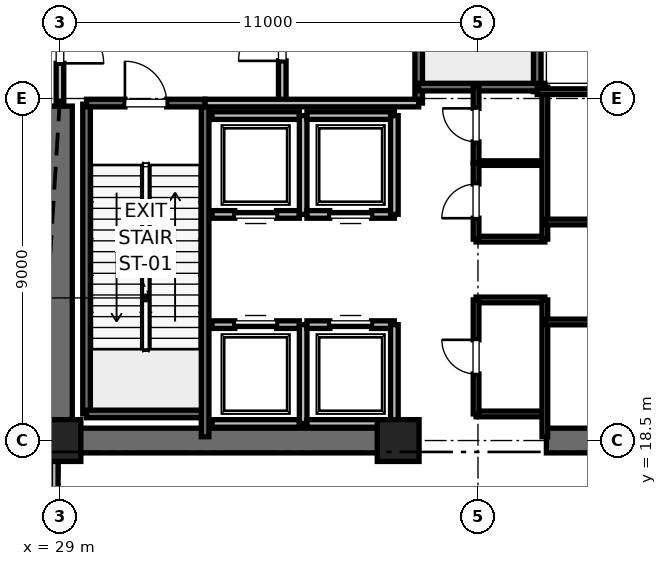
"""IFC4 building model, lengths in metres.
Left out: names, types, materials, properties, quantities, classifications, styles, units other than length and angle.
Written with IfcOpenShell. Run it as: python <this file> out.ifc"""

import sys

from ifc_helpers import new_model, si_unit, direction, frame, frame_2d, origin, origin_2d, place, context, subcontext, project, spatial, rectangle, extrude, element, fill, save


model = new_model("IFC4")
c1 = context("Model", 3, precision=1e-05, world=origin(), true_north=direction((0.0, 1.0)))
c2 = subcontext(c1, "Body", "Model", "MODEL_VIEW")
j1 = project(units=[si_unit("LENGTHUNIT", "METRE"), si_unit("PLANEANGLEUNIT", "RADIAN")], contexts=[c1])
p1 = place(None, origin())
s1 = spatial("IfcSite", under=j1, at=p1, CompositionType="ELEMENT")
p2 = place(p1, origin())
s2 = spatial("IfcBuilding", under=s1, at=p2, CompositionType="ELEMENT")
p3 = place(p2, origin())
s3 = spatial("IfcBuildingStorey", under=s2, at=p3, CompositionType="ELEMENT", Elevation=0.0)
for number, where, z_axis, x_axis in (
    (1, (29.0, 18.5, 0.0), (0.0, 0.0, 1.0), (1.0, 0.0, 0.0)),
    (2, (37.9, 18.5, 0.0), (0.0, 0.0, 1.0), (1.0, 0.0, 0.0)),
):
    element("IfcColumn", number, at=place(p3, frame(where, z_axis=z_axis, x_axis=x_axis)), inside=s3, PredefinedType="PILASTER", context=c2, shape_type="SweptSolid", body=[
        extrude(rectangle(XDim=1.1, YDim=1.1, at=origin_2d()), origin(), (0.0, 0.0, 1.0), 6.0),
    ])
for number, where, z_axis, x_axis in (
    (3, (29.0, 18.5, 0.0), (0.0, 0.0, 1.0), (1.0, 0.0, 0.0)),
    (4, (41.8, 18.5, 0.0), (0.0, 0.0, 1.0), (1.0, 0.0, 0.0)),
):
    element("IfcWall", number, at=place(p3, frame(where, z_axis=z_axis, x_axis=x_axis)), inside=s3, PredefinedType="SHEAR", context=c2, shape_type="SweptSolid", body=[
        extrude(rectangle(XDim=9.2, YDim=0.65, at=frame_2d((4.6, 0.0))), origin(), (0.0, 0.0, 1.0), 5.72),
    ])
p4 = place(p3, frame((29.0, 18.5, 0.0), z_axis=(0.0, 0.0, 1.0), x_axis=(0.0, 1.0, 0.0)))
e5 = element("IfcWall", 5, at=p4, inside=s3, PredefinedType="SHEAR", context=c2, shape_type="SweptSolid", body=[
    extrude(rectangle(XDim=8.8, YDim=0.65, at=frame_2d((4.4, 0.0))), origin(), (0.0, 0.0, 1.0), 5.72),
])
p5 = place(p3, frame((29.7, 19.2, 0.0), z_axis=(0.0, 0.0, 1.0), x_axis=(0.0, 1.0, 0.0)))
e6 = element("IfcWall", 6, at=p5, inside=s3, PredefinedType="SOLIDWALL", context=c2, shape_type="SweptSolid", body=[
    extrude(rectangle(XDim=8.15, YDim=0.2, at=frame_2d((4.075, 0.0))), origin(), (0.0, 0.0, 1.0), 5.72),
])
p6 = place(p3, frame((29.7, 19.2, 0.0), z_axis=(0.0, 0.0, 1.0), x_axis=(1.0, 0.0, 0.0)))
e7 = element("IfcWall", 7, at=p6, inside=s3, PredefinedType="SOLIDWALL", context=c2, shape_type="SweptSolid", body=[
    extrude(rectangle(XDim=3.12, YDim=0.2, at=frame_2d((1.56, 0.0))), origin(), (0.0, 0.0, 1.0), 5.72),
])
p7 = place(p3, frame((32.82, 18.6, 0.0), z_axis=(0.0, 0.0, 1.0), x_axis=(0.0, 1.0, 0.0)))
e8 = element("IfcWall", 8, at=p7, inside=s3, PredefinedType="SOLIDWALL", context=c2, shape_type="SweptSolid", body=[
    extrude(rectangle(XDim=8.78, YDim=0.2, at=frame_2d((4.39, 0.0))), origin(), (0.0, 0.0, 1.0), 5.72),
])
p8 = place(p3, frame((29.7, 27.38, 0.0), z_axis=(0.0, 0.0, 1.0), x_axis=(1.0, 0.0, 0.0)))
e9 = element("IfcWall", 9, at=p8, inside=s3, PredefinedType="SOLIDWALL", context=c2, shape_type="SweptSolid", body=[
    extrude(rectangle(XDim=3.12, YDim=0.2, at=frame_2d((1.56, 0.0))), origin(), (0.0, 0.0, 1.0), 5.72),
])
p9 = place(p8, frame((1.01, 0.0, 0.0)))
e10 = element("IfcOpeningElement", 10, at=p9, cuts=e9, PredefinedType="OPENING", context=c2, shape_type="SweptSolid", body=[
    extrude(rectangle(XDim=1.1, YDim=2.15, at=frame_2d((0.55, 1.075))), frame((0.0, 0.1, 0.0), z_axis=(0.0, -1.0, 0.0), x_axis=(1.0, 0.0, 0.0)), (0.0, 0.0, 1.0), 0.2),
])
p10 = place(p3, frame((38.44, 27.38, 0.0), z_axis=(0.0, 0.0, 1.0), x_axis=(0.0, 1.0, 0.0)))
e11 = element("IfcWall", 11, at=p10, inside=s3, PredefinedType="SOLIDWALL", context=c2, shape_type="SweptSolid", body=[
    extrude(rectangle(XDim=8.87, YDim=0.2, at=frame_2d((4.435, 0.0))), origin(), (0.0, 0.0, 1.0), 5.72),
])
p11 = place(p3, frame((41.56, 27.68, 0.0), z_axis=(0.0, 0.0, 1.0), x_axis=(0.0, 1.0, 0.0)))
e12 = element("IfcWall", 12, at=p11, inside=s3, PredefinedType="SOLIDWALL", context=c2, shape_type="SweptSolid", body=[
    extrude(rectangle(XDim=8.57, YDim=0.2, at=frame_2d((4.285, 0.0))), origin(), (0.0, 0.0, 1.0), 5.72),
])
p12 = place(p3, frame((38.44, 27.8, 0.0), z_axis=(0.0, 0.0, 1.0), x_axis=(1.0, 0.0, 0.0)))
e13 = element("IfcWall", 13, at=p12, inside=s3, PredefinedType="SOLIDWALL", context=c2, shape_type="SweptSolid", body=[
    extrude(rectangle(XDim=3.32, YDim=0.2, at=frame_2d((1.66, 0.0))), origin(), (0.0, 0.0, 1.0), 5.72),
])
p13 = place(p3, frame((34.85, 27.38, 0.0), z_axis=(0.0, 0.0, 1.0), x_axis=(0.0, 1.0, 0.0)))
e14 = element("IfcWall", 14, at=p13, inside=s3, PredefinedType="PARTITIONING", context=c2, shape_type="SweptSolid", body=[
    extrude(rectangle(XDim=3.37, YDim=0.2, at=frame_2d((1.685, 0.0))), origin(), (0.0, 0.0, 1.0), 5.72),
])
p14 = place(p13, frame((1.11, 0.0, 0.0)))
e15 = element("IfcOpeningElement", 15, at=p14, cuts=e14, PredefinedType="OPENING", context=c2, shape_type="SweptSolid", body=[
    extrude(rectangle(XDim=1.15, YDim=2.2, at=frame_2d((0.575, 1.1))), frame((0.0, 0.1, 0.0), z_axis=(0.0, -1.0, 0.0), x_axis=(1.0, 0.0, 0.0)), (0.0, 0.0, 1.0), 0.2),
])
p15 = place(p3, frame((29.0, 30.7, 0.0), z_axis=(0.0, 0.0, 1.0), x_axis=(0.0, -1.0, 0.0)))
e16 = element("IfcWall", 16, at=p15, inside=s3, PredefinedType="PARTITIONING", context=c2, shape_type="SweptSolid", body=[
    extrude(rectangle(XDim=3.4, YDim=0.2, at=frame_2d((1.7, 0.0))), origin(), (0.0, 0.0, 1.0), 4.5),
])
p16 = place(p15, frame((1.125, 0.0, 0.0)))
e17 = element("IfcOpeningElement", 17, at=p16, cuts=e16, PredefinedType="OPENING", context=c2, shape_type="SweptSolid", body=[
    extrude(rectangle(XDim=1.15, YDim=2.2, at=frame_2d((0.575, 1.1))), frame((0.0, 0.1, 0.0), z_axis=(0.0, -1.0, 0.0), x_axis=(1.0, 0.0, 0.0)), (0.0, 0.0, 1.0), 0.2),
])
p17 = place(p3, frame((32.82, 27.38, 0.0), z_axis=(0.0, 0.0, 1.0), x_axis=(1.0, 0.0, 0.0)))
e18 = element("IfcWall", 18, at=p17, inside=s3, PredefinedType="PARTITIONING", context=c2, shape_type="SweptSolid", body=[
    extrude(rectangle(XDim=5.62, YDim=0.2, at=frame_2d((2.81, 0.0))), origin(), (0.0, 0.0, 1.0), 5.72),
])
p18 = place(p3, frame((33.0, 18.95, 0.0), z_axis=(0.0, 0.0, 1.0), x_axis=(1.0, 0.0, 0.0)))
e19 = element("IfcWall", 19, at=p18, inside=s3, PredefinedType="SOLIDWALL", context=c2, shape_type="SweptSolid", body=[
    extrude(rectangle(XDim=2.3, YDim=0.2, at=frame_2d((1.15, 0.0))), origin(), (0.0, 0.0, 1.0), 5.72),
])
p19 = place(p3, frame((35.3, 21.55, 0.0), z_axis=(0.0, 0.0, 1.0), x_axis=(-1.0, 0.0, 0.0)))
e20 = element("IfcWall", 20, at=p19, inside=s3, PredefinedType="SOLIDWALL", context=c2, shape_type="SweptSolid", body=[
    extrude(rectangle(XDim=2.3, YDim=0.2, at=frame_2d((1.15, 0.0))), origin(), (0.0, 0.0, 1.0), 5.72),
])
p20 = place(p19, frame((0.6, 0.0, 0.0)))
e21 = element("IfcOpeningElement", 21, at=p20, cuts=e20, PredefinedType="OPENING", context=c2, shape_type="SweptSolid", body=[
    extrude(rectangle(XDim=1.1, YDim=2.2, at=frame_2d((0.55, 1.1))), frame((0.0, 0.1, 0.0), z_axis=(0.0, -1.0, 0.0), x_axis=(1.0, 0.0, 0.0)), (0.0, 0.0, 1.0), 0.2),
])
p21 = place(p3, frame((35.4, 18.95, 0.0), z_axis=(0.0, 0.0, 1.0), x_axis=(0.0, 1.0, 0.0)))
e22 = element("IfcWall", 22, at=p21, inside=s3, PredefinedType="SOLIDWALL", context=c2, shape_type="SweptSolid", body=[
    extrude(rectangle(XDim=2.6, YDim=0.2, at=frame_2d((1.3, 0.0))), origin(), (0.0, 0.0, 1.0), 5.72),
])
p22 = place(p3, frame((35.5, 18.95, 0.0), z_axis=(0.0, 0.0, 1.0), x_axis=(1.0, 0.0, 0.0)))
e23 = element("IfcWall", 23, at=p22, inside=s3, PredefinedType="SOLIDWALL", context=c2, shape_type="SweptSolid", body=[
    extrude(rectangle(XDim=2.3, YDim=0.2, at=frame_2d((1.15, 0.0))), origin(), (0.0, 0.0, 1.0), 4.5),
])
p23 = place(p3, frame((37.8, 21.55, 0.0), z_axis=(0.0, 0.0, 1.0), x_axis=(-1.0, 0.0, 0.0)))
e24 = element("IfcWall", 24, at=p23, inside=s3, PredefinedType="SOLIDWALL", context=c2, shape_type="SweptSolid", body=[
    extrude(rectangle(XDim=2.3, YDim=0.2, at=frame_2d((1.15, 0.0))), origin(), (0.0, 0.0, 1.0), 5.72),
])
p24 = place(p23, frame((0.6, 0.0, 0.0)))
e25 = element("IfcOpeningElement", 25, at=p24, cuts=e24, PredefinedType="OPENING", context=c2, shape_type="SweptSolid", body=[
    extrude(rectangle(XDim=1.1, YDim=2.2, at=frame_2d((0.55, 1.1))), frame((0.0, 0.1, 0.0), z_axis=(0.0, -1.0, 0.0), x_axis=(1.0, 0.0, 0.0)), (0.0, 0.0, 1.0), 0.2),
])
p25 = place(p3, frame((37.8, 18.95, 0.0), z_axis=(0.0, 0.0, 1.0), x_axis=(0.0, 1.0, 0.0)))
e26 = element("IfcWall", 26, at=p25, inside=s3, PredefinedType="SOLIDWALL", context=c2, shape_type="SweptSolid", body=[
    extrude(rectangle(XDim=2.6, YDim=0.2, at=frame_2d((1.3, 0.0))), origin(), (0.0, 0.0, 1.0), 4.5),
])
p26 = place(p3, frame((33.0, 24.45, 0.0), z_axis=(0.0, 0.0, 1.0), x_axis=(1.0, 0.0, 0.0)))
e27 = element("IfcWall", 27, at=p26, inside=s3, PredefinedType="SOLIDWALL", context=c2, shape_type="SweptSolid", body=[
    extrude(rectangle(XDim=2.3, YDim=0.2, at=frame_2d((1.15, 0.0))), origin(), (0.0, 0.0, 1.0), 5.72),
])
p27 = place(p26, frame((0.6, 0.0, 0.0)))
e28 = element("IfcOpeningElement", 28, at=p27, cuts=e27, PredefinedType="OPENING", context=c2, shape_type="SweptSolid", body=[
    extrude(rectangle(XDim=1.1, YDim=2.2, at=frame_2d((0.55, 1.1))), frame((0.0, 0.1, 0.0), z_axis=(0.0, -1.0, 0.0), x_axis=(1.0, 0.0, 0.0)), (0.0, 0.0, 1.0), 0.2),
])
p28 = place(p3, frame((35.3, 27.05, 0.0), z_axis=(0.0, 0.0, 1.0), x_axis=(-1.0, 0.0, 0.0)))
e29 = element("IfcWall", 29, at=p28, inside=s3, PredefinedType="SOLIDWALL", context=c2, shape_type="SweptSolid", body=[
    extrude(rectangle(XDim=2.3, YDim=0.2, at=frame_2d((1.15, 0.0))), origin(), (0.0, 0.0, 1.0), 5.72),
])
p29 = place(p3, frame((35.4, 24.45, 0.0), z_axis=(0.0, 0.0, 1.0), x_axis=(0.0, 1.0, 0.0)))
e30 = element("IfcWall", 30, at=p29, inside=s3, PredefinedType="SOLIDWALL", context=c2, shape_type="SweptSolid", body=[
    extrude(rectangle(XDim=2.6, YDim=0.2, at=frame_2d((1.3, 0.0))), origin(), (0.0, 0.0, 1.0), 5.72),
])
p30 = place(p3, frame((35.5, 24.45, 0.0), z_axis=(0.0, 0.0, 1.0), x_axis=(1.0, 0.0, 0.0)))
e31 = element("IfcWall", 31, at=p30, inside=s3, PredefinedType="SOLIDWALL", context=c2, shape_type="SweptSolid", body=[
    extrude(rectangle(XDim=2.3, YDim=0.2, at=frame_2d((1.15, 0.0))), origin(), (0.0, 0.0, 1.0), 5.72),
])
p31 = place(p30, frame((0.6, 0.0, 0.0)))
e32 = element("IfcOpeningElement", 32, at=p31, cuts=e31, PredefinedType="OPENING", context=c2, shape_type="SweptSolid", body=[
    extrude(rectangle(XDim=1.1, YDim=2.2, at=frame_2d((0.55, 1.1))), frame((0.0, 0.1, 0.0), z_axis=(0.0, -1.0, 0.0), x_axis=(1.0, 0.0, 0.0)), (0.0, 0.0, 1.0), 0.2),
])
p32 = place(p3, frame((37.8, 27.05, 0.0), z_axis=(0.0, 0.0, 1.0), x_axis=(-1.0, 0.0, 0.0)))
e33 = element("IfcWall", 33, at=p32, inside=s3, PredefinedType="SOLIDWALL", context=c2, shape_type="SweptSolid", body=[
    extrude(rectangle(XDim=2.3, YDim=0.2, at=frame_2d((1.15, 0.0))), origin(), (0.0, 0.0, 1.0), 5.72),
])
p33 = place(p3, frame((37.8, 24.45, 0.0), z_axis=(0.0, 0.0, 1.0), x_axis=(0.0, 1.0, 0.0)))
e34 = element("IfcWall", 34, at=p33, inside=s3, PredefinedType="SOLIDWALL", context=c2, shape_type="SweptSolid", body=[
    extrude(rectangle(XDim=2.6, YDim=0.2, at=frame_2d((1.3, 0.0))), origin(), (0.0, 0.0, 1.0), 5.72),
])
for number, where, z_axis, x_axis in (
    (35, (39.95, 19.2, 0.0), (0.0, 0.0, 1.0), (1.0, 0.0, 0.0)),
    (36, (39.95, 22.2, 0.0), (0.0, 0.0, 1.0), (1.0, 0.0, 0.0)),
    (37, (39.95, 23.8, 0.0), (0.0, 0.0, 1.0), (1.0, 0.0, 0.0)),
):
    element("IfcWall", number, at=place(p3, frame(where, z_axis=z_axis, x_axis=x_axis)), inside=s3, PredefinedType="PARTITIONING", context=c2, shape_type="SweptSolid", body=[
        extrude(rectangle(XDim=1.81, YDim=0.15, at=frame_2d((0.905, 0.0))), origin(), (0.0, 0.0, 1.0), 2.85),
    ])
p34 = place(p3, frame((39.95, 25.8, 0.0), z_axis=(0.0, 0.0, 1.0), x_axis=(1.0, 0.0, 0.0)))
e38 = element("IfcWall", 38, at=p34, inside=s3, PredefinedType="PARTITIONING", context=c2, shape_type="SweptSolid", body=[
    extrude(rectangle(XDim=1.81, YDim=0.12, at=frame_2d((0.905, 0.0))), origin(), (0.0, 0.0, 1.0), 2.85),
])
p35 = place(p3, frame((41.76, 18.6, 0.0), z_axis=(0.0, 0.0, 1.0), x_axis=(0.0, 1.0, 0.0)))
e39 = element("IfcWall", 39, at=p35, inside=s3, PredefinedType="PARTITIONING", context=c2, shape_type="SweptSolid", body=[
    extrude(rectangle(XDim=3.6, YDim=0.15, at=frame_2d((1.8, 0.0))), origin(), (0.0, 0.0, 1.0), 2.85),
])
p36 = place(p3, frame((41.76, 23.8, 0.0), z_axis=(0.0, 0.0, 1.0), x_axis=(0.0, 1.0, 0.0)))
e40 = element("IfcWall", 40, at=p36, inside=s3, PredefinedType="PARTITIONING", context=c2, shape_type="SweptSolid", body=[
    extrude(rectangle(XDim=4.0, YDim=0.15, at=frame_2d((2.0, 0.0))), origin(), (0.0, 0.0, 1.0), 2.85),
])
p37 = place(p3, frame((39.95, 19.2, 0.0), z_axis=(0.0, 0.0, 1.0), x_axis=(0.0, 1.0, 0.0)))
e41 = element("IfcWall", 41, at=p37, inside=s3, PredefinedType="PARTITIONING", context=c2, shape_type="SweptSolid", body=[
    extrude(rectangle(XDim=3.0, YDim=0.15, at=frame_2d((1.5, 0.0))), origin(), (0.0, 0.0, 1.0), 2.85),
])
p38 = place(p37, frame((1.05, 0.0, 0.0)))
e42 = element("IfcOpeningElement", 42, at=p38, cuts=e41, PredefinedType="OPENING", context=c2, shape_type="SweptSolid", body=[
    extrude(rectangle(XDim=0.9, YDim=2.1, at=frame_2d((0.45, 1.05))), frame((0.0, 0.075, 0.0), z_axis=(0.0, -1.0, 0.0), x_axis=(1.0, 0.0, 0.0)), (0.0, 0.0, 1.0), 0.15),
])
p39 = place(p3, frame((39.95, 23.8, 0.0), z_axis=(0.0, 0.0, 1.0), x_axis=(0.0, 1.0, 0.0)))
e43 = element("IfcWall", 43, at=p39, inside=s3, PredefinedType="PARTITIONING", context=c2, shape_type="SweptSolid", body=[
    extrude(rectangle(XDim=2.0, YDim=0.15, at=frame_2d((1.0, 0.0))), origin(), (0.0, 0.0, 1.0), 2.85),
])
p40 = place(p39, frame((0.55, 0.0, 0.0)))
e44 = element("IfcOpeningElement", 44, at=p40, cuts=e43, PredefinedType="OPENING", context=c2, shape_type="SweptSolid", body=[
    extrude(rectangle(XDim=0.9, YDim=2.1, at=frame_2d((0.45, 1.05))), frame((0.0, 0.075, 0.0), z_axis=(0.0, -1.0, 0.0), x_axis=(1.0, 0.0, 0.0)), (0.0, 0.0, 1.0), 0.15),
])
p41 = place(p3, frame((39.95, 25.8, 0.0), z_axis=(0.0, 0.0, 1.0), x_axis=(0.0, 1.0, 0.0)))
e45 = element("IfcWall", 45, at=p41, inside=s3, PredefinedType="PARTITIONING", context=c2, shape_type="SweptSolid", body=[
    extrude(rectangle(XDim=2.0, YDim=0.15, at=frame_2d((1.0, 0.0))), origin(), (0.0, 0.0, 1.0), 2.85),
])
p42 = place(p41, frame((0.56, 0.0, 0.0)))
e46 = element("IfcOpeningElement", 46, at=p42, cuts=e45, PredefinedType="OPENING", context=c2, shape_type="SweptSolid", body=[
    extrude(rectangle(XDim=0.88, YDim=2.1, at=frame_2d((0.44, 1.05))), frame((0.0, 0.075, 0.0), z_axis=(0.0, -1.0, 0.0), x_axis=(1.0, 0.0, 0.0)), (0.0, 0.0, 1.0), 0.15),
])
p43 = place(p3, frame((41.56, 27.68, 0.0), z_axis=(0.0, 0.0, 1.0), x_axis=(1.0, 0.0, 0.0)))
e47 = element("IfcWall", 47, at=p43, inside=s3, PredefinedType="PARTITIONING", context=c2, shape_type="SweptSolid", body=[
    extrude(rectangle(XDim=3.59, YDim=0.15, at=frame_2d((1.795, 0.0))), origin(), (0.0, 0.0, 1.0), 2.85),
])
p44 = place(p3, frame((41.76, 21.62, 0.0), z_axis=(0.0, 0.0, 1.0), x_axis=(1.0, 0.0, 0.0)))
e48 = element("IfcWall", 48, at=p44, inside=s3, PredefinedType="PARTITIONING", context=c2, shape_type="SweptSolid", body=[
    extrude(rectangle(XDim=5.98, YDim=0.15, at=frame_2d((2.99, 0.0))), origin(), (0.0, 0.0, 1.0), 2.85),
])
p45 = place(p44, frame((2.49, 0.0, 0.0)))
e49 = element("IfcOpeningElement", 49, at=p45, cuts=e48, PredefinedType="OPENING", context=c2, shape_type="SweptSolid", body=[
    extrude(rectangle(XDim=1.0, YDim=2.15, at=frame_2d((0.5, 1.075))), frame((0.0, 0.075, 0.0), z_axis=(0.0, -1.0, 0.0), x_axis=(1.0, 0.0, 0.0)), (0.0, 0.0, 1.0), 0.15),
])
p46 = place(p3, frame((41.76, 24.25, 0.0), z_axis=(0.0, 0.0, 1.0), x_axis=(1.0, 0.0, 0.0)))
e50 = element("IfcWall", 50, at=p46, inside=s3, PredefinedType="PARTITIONING", context=c2, shape_type="SweptSolid", body=[
    extrude(rectangle(XDim=3.39, YDim=0.15, at=frame_2d((1.695, 0.0))), origin(), (0.0, 0.0, 1.0), 2.85),
])
p47 = place(p46, frame((1.195, 0.0, 0.0)))
e51 = element("IfcOpeningElement", 51, at=p47, cuts=e50, PredefinedType="OPENING", context=c2, shape_type="SweptSolid", body=[
    extrude(rectangle(XDim=1.0, YDim=2.15, at=frame_2d((0.5, 1.075))), frame((0.0, 0.075, 0.0), z_axis=(0.0, -1.0, 0.0), x_axis=(1.0, 0.0, 0.0)), (0.0, 0.0, 1.0), 0.15),
])
p48 = place(p3, frame((28.85, -1.35, 0.0), z_axis=(0.0, 0.0, 1.0), x_axis=(0.0, 1.0, 0.0)))
e52 = element("IfcWall", 52, at=p48, inside=s3, PredefinedType="PARTITIONING", context=c2, shape_type="SweptSolid", body=[
    extrude(rectangle(XDim=19.75, YDim=0.2, at=frame_2d((9.875, 0.0))), origin(), (0.0, 0.0, 1.0), 2.85),
])
p49 = place(p48, frame((9.3, 0.0, 0.0)))
e53 = element("IfcOpeningElement", 53, at=p49, cuts=e52, PredefinedType="OPENING", context=c2, shape_type="SweptSolid", body=[
    extrude(rectangle(XDim=1.15, YDim=2.2, at=frame_2d((0.575, 1.1))), frame((0.0, 0.1, 0.0), z_axis=(0.0, -1.0, 0.0), x_axis=(1.0, 0.0, 0.0)), (0.0, 0.0, 1.0), 0.2),
])
p50 = place(p9, origin())
e54 = element("IfcDoor", 54, at=p50, inside=s3, OperationType="SINGLE_SWING_LEFT", PredefinedType="DOOR", context=c2, shape_type="SweptSolid", body=[
    extrude(rectangle(XDim=1.1, YDim=2.15, at=frame_2d((0.55, 1.075))), frame((0.0, 0.025, 0.0), z_axis=(0.0, -1.0, 0.0), x_axis=(1.0, 0.0, 0.0)), (0.0, 0.0, 1.0), 0.05),
])
fill(e10, e54)
p51 = place(p14, origin())
e55 = element("IfcDoor", 55, at=p51, inside=s3, OperationType="SINGLE_SWING_LEFT", PredefinedType="DOOR", context=c2, shape_type="SweptSolid", body=[
    extrude(rectangle(XDim=1.15, YDim=2.2, at=frame_2d((0.575, 1.1))), frame((0.0, 0.025, 0.0), z_axis=(0.0, -1.0, 0.0), x_axis=(1.0, 0.0, 0.0)), (0.0, 0.0, 1.0), 0.05),
])
fill(e15, e55)
p52 = place(p16, origin())
e56 = element("IfcDoor", 56, at=p52, inside=s3, OperationType="SINGLE_SWING_RIGHT", PredefinedType="DOOR", context=c2, shape_type="SweptSolid", body=[
    extrude(rectangle(XDim=1.15, YDim=2.2, at=frame_2d((0.575, 1.1))), frame((0.0, 0.025, 0.0), z_axis=(0.0, -1.0, 0.0), x_axis=(1.0, 0.0, 0.0)), (0.0, 0.0, 1.0), 0.05),
])
fill(e17, e56)
p53 = place(p20, origin())
e57 = element("IfcDoor", 57, at=p53, inside=s3, OperationType="SLIDING_TO_RIGHT", PredefinedType="DOOR", context=c2, shape_type="SweptSolid", body=[
    extrude(rectangle(XDim=1.1, YDim=2.2, at=frame_2d((0.55, 1.1))), frame((0.0, 0.025, 0.0), z_axis=(0.0, -1.0, 0.0), x_axis=(1.0, 0.0, 0.0)), (0.0, 0.0, 1.0), 0.05),
])
fill(e21, e57)
p54 = place(p24, origin())
e58 = element("IfcDoor", 58, at=p54, inside=s3, OperationType="SLIDING_TO_RIGHT", PredefinedType="DOOR", context=c2, shape_type="SweptSolid", body=[
    extrude(rectangle(XDim=1.1, YDim=2.2, at=frame_2d((0.55, 1.1))), frame((0.0, 0.025, 0.0), z_axis=(0.0, -1.0, 0.0), x_axis=(1.0, 0.0, 0.0)), (0.0, 0.0, 1.0), 0.05),
])
fill(e25, e58)
p55 = place(p27, origin())
e59 = element("IfcDoor", 59, at=p55, inside=s3, OperationType="SLIDING_TO_RIGHT", PredefinedType="DOOR", context=c2, shape_type="SweptSolid", body=[
    extrude(rectangle(XDim=1.1, YDim=2.2, at=frame_2d((0.55, 1.1))), frame((0.0, 0.025, 0.0), z_axis=(0.0, -1.0, 0.0), x_axis=(1.0, 0.0, 0.0)), (0.0, 0.0, 1.0), 0.05),
])
fill(e28, e59)
p56 = place(p31, origin())
e60 = element("IfcDoor", 60, at=p56, inside=s3, OperationType="SLIDING_TO_RIGHT", PredefinedType="DOOR", context=c2, shape_type="SweptSolid", body=[
    extrude(rectangle(XDim=1.1, YDim=2.2, at=frame_2d((0.55, 1.1))), frame((0.0, 0.025, 0.0), z_axis=(0.0, -1.0, 0.0), x_axis=(1.0, 0.0, 0.0)), (0.0, 0.0, 1.0), 0.05),
])
fill(e32, e60)
p57 = place(p38, origin())
e61 = element("IfcDoor", 61, at=p57, inside=s3, OperationType="SINGLE_SWING_RIGHT", PredefinedType="DOOR", context=c2, shape_type="SweptSolid", body=[
    extrude(rectangle(XDim=0.9, YDim=2.1, at=frame_2d((0.45, 1.05))), frame((0.0, 0.025, 0.0), z_axis=(0.0, -1.0, 0.0), x_axis=(1.0, 0.0, 0.0)), (0.0, 0.0, 1.0), 0.05),
])
fill(e42, e61)
p58 = place(p40, origin())
e62 = element("IfcDoor", 62, at=p58, inside=s3, OperationType="SINGLE_SWING_LEFT", PredefinedType="DOOR", context=c2, shape_type="SweptSolid", body=[
    extrude(rectangle(XDim=0.9, YDim=2.1, at=frame_2d((0.45, 1.05))), frame((0.0, 0.025, 0.0), z_axis=(0.0, -1.0, 0.0), x_axis=(1.0, 0.0, 0.0)), (0.0, 0.0, 1.0), 0.05),
])
fill(e44, e62)
p59 = place(p42, origin())
e63 = element("IfcDoor", 63, at=p59, inside=s3, OperationType="SINGLE_SWING_RIGHT", PredefinedType="DOOR", context=c2, shape_type="SweptSolid", body=[
    extrude(rectangle(XDim=0.88, YDim=2.1, at=frame_2d((0.44, 1.05))), frame((0.0, 0.025, 0.0), z_axis=(0.0, -1.0, 0.0), x_axis=(1.0, 0.0, 0.0)), (0.0, 0.0, 1.0), 0.05),
])
fill(e46, e63)
save(model, sys.argv[1])
